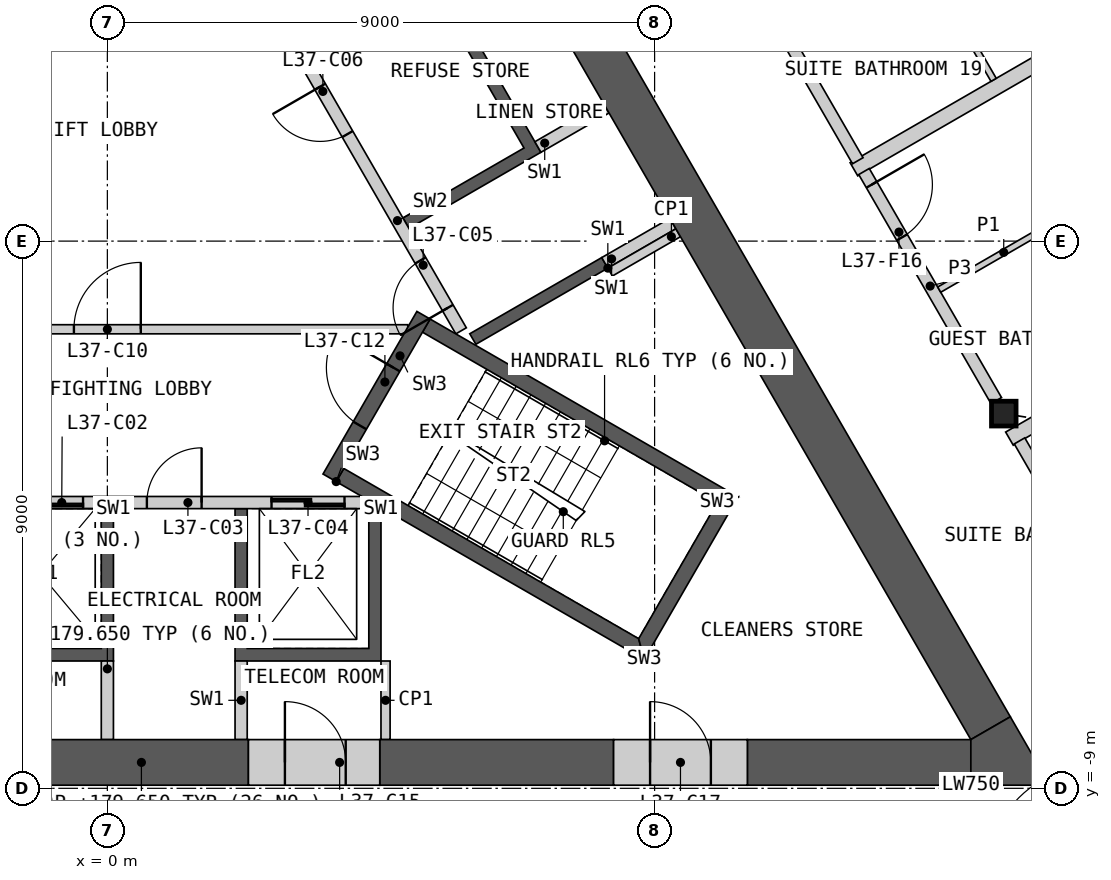
"""IFC4 building model, lengths in metres.
Left out: names, types, materials, properties, quantities, classifications, styles, units other than length and angle.
Written with IfcOpenShell. Run it as: python <this file> out.ifc"""

import sys

from ifc_helpers import new_model, si_unit, direction, frame, frame_2d, origin, origin_2d, place, context, subcontext, project, spatial, polyline, rectangle, i_section, outline, extrude, element, fill, save


model = new_model("IFC4")
c1 = context("Model", 3, precision=1e-05, world=origin(), true_north=direction((0.0, 1.0)))
c2 = subcontext(c1, "Body", "Model", "MODEL_VIEW")
j1 = project(units=[si_unit("LENGTHUNIT", "METRE"), si_unit("PLANEANGLEUNIT", "RADIAN")], contexts=[c1])
p1 = place(None, origin())
s1 = spatial("IfcSite", under=j1, at=p1, CompositionType="ELEMENT")
p2 = place(p1, origin())
s2 = spatial("IfcBuilding", under=s1, at=p2, CompositionType="ELEMENT")
p3 = place(p2, frame((0.0, 0.0, 176.4)))
s3 = spatial("IfcBuildingStorey", under=s2, at=p3, CompositionType="ELEMENT", Elevation=176.4)
p4 = place(p3, frame((14.743, -2.837, 0.0), z_axis=(0.0, 0.0, 1.0), x_axis=(1.0, 0.0, 0.0)))
e1 = element("IfcColumn", 1, at=p4, inside=s3, PredefinedType="COLUMN", context=c2, shape_type="SweptSolid", body=[
    extrude(i_section(OverallWidth=0.404, OverallDepth=0.407, WebThickness=0.027, FlangeThickness=0.044, at=origin_2d()), origin(), (0.0, 0.0, 1.0), 3.6),
])
p5 = place(p3, origin())
e2 = element("IfcWall", 2, at=p5, inside=s3, PredefinedType="SHEAR", context=c2, shape_type="SweptSolid", body=[
    extrude(outline(polyline([(4.5, -4.4), (4.5, -6.906), (2.1, -6.906), (2.1, -4.4), (2.3, -4.4), (2.3, -6.7), (4.3, -6.7), (4.3, -4.4), (4.5, -4.4)])), origin(), (0.0, 0.0, 1.0), 3.25),
])
p6 = place(p3, origin())
e3 = element("IfcWall", 3, at=p6, inside=s3, PredefinedType="SHEAR", context=c2, shape_type="SweptSolid", body=[
    extrude(outline(polyline([(0.1, -4.4), (0.1, -6.906), (-4.5, -6.906), (-4.5, -4.4), (-4.3, -4.4), (-4.3, -6.7), (-2.3, -6.7), (-2.3, -4.4), (-2.1, -4.4), (-2.1, -6.7), (-0.1, -6.7), (-0.1, -4.4), (0.1, -4.4)])), origin(), (0.0, 0.0, 1.0), 3.25),
])
p7 = place(p3, frame((-4.187, -4.3, 0.0), z_axis=(0.0, 0.0, 1.0), x_axis=(1.0, 0.0, 0.0)))
e4 = element("IfcWall", 4, at=p7, inside=s3, PredefinedType="SOLIDWALL", context=c2, shape_type="SweptSolid", body=[
    extrude(rectangle(XDim=8.373, YDim=0.2, at=frame_2d((4.187, 0.0))), origin(), (0.0, 0.0, 1.0), 3.25),
])
p8 = place(p7, frame((0.287, 0.0, 0.0)))
e5 = element("IfcOpeningElement", 5, at=p8, cuts=e4, PredefinedType="OPENING", context=c2, shape_type="SweptSolid", body=[
    extrude(rectangle(XDim=1.2, YDim=2.1, at=frame_2d((0.6, 1.05))), frame((0.0, 0.11, 0.0), z_axis=(0.0, -1.0, 0.0), x_axis=(1.0, 0.0, 0.0)), (0.0, 0.0, 1.0), 0.22),
])
p9 = place(p7, frame((2.387, 0.0, 0.0)))
e6 = element("IfcOpeningElement", 6, at=p9, cuts=e4, PredefinedType="OPENING", context=c2, shape_type="SweptSolid", body=[
    extrude(rectangle(XDim=1.4, YDim=2.1, at=frame_2d((0.7, 1.05))), frame((0.0, 0.11, 0.0), z_axis=(0.0, -1.0, 0.0), x_axis=(1.0, 0.0, 0.0)), (0.0, 0.0, 1.0), 0.22),
])
p10 = place(p7, frame((4.837, 0.0, 0.0)))
e7 = element("IfcOpeningElement", 7, at=p10, cuts=e4, PredefinedType="OPENING", context=c2, shape_type="SweptSolid", body=[
    extrude(rectangle(XDim=0.9, YDim=2.1, at=frame_2d((0.45, 1.05))), frame((0.0, 0.11, 0.0), z_axis=(0.0, -1.0, 0.0), x_axis=(1.0, 0.0, 0.0)), (0.0, 0.0, 1.0), 0.22),
])
p11 = place(p7, frame((6.887, 0.0, 0.0)))
e8 = element("IfcOpeningElement", 8, at=p11, cuts=e4, PredefinedType="OPENING", context=c2, shape_type="SweptSolid", body=[
    extrude(rectangle(XDim=1.2, YDim=2.1, at=frame_2d((0.6, 1.05))), frame((0.0, 0.11, 0.0), z_axis=(0.0, -1.0, 0.0), x_axis=(1.0, 0.0, 0.0)), (0.0, 0.0, 1.0), 0.22),
])
for number, where, z_axis, x_axis in (
    (9, (0.0, -6.906, 0.0), (0.0, 0.0, 1.0), (0.0, -1.0, 0.0)),
    (10, (2.2, -6.906, 0.0), (0.0, 0.0, 1.0), (0.0, -1.0, 0.0)),
):
    element("IfcWall", number, at=place(p3, frame(where, z_axis=z_axis, x_axis=x_axis)), inside=s3, PredefinedType="SHEAR", context=c2, shape_type="SweptSolid", body=[
        extrude(rectangle(XDim=1.293, YDim=0.2, at=frame_2d((0.646, 0.0))), origin(), (0.0, 0.0, 1.0), 3.25),
    ])
p12 = place(p3, origin())
e11 = element("IfcWall", 11, at=p12, inside=s3, PredefinedType="SHEAR", context=c2, shape_type="SweptSolid", body=[
    extrude(outline(polyline([(1.561, 6.097), (3.731, 7.35), (7.131, 1.461), (4.96, 0.208), (4.861, 0.381), (6.852, 1.531), (4.752, 5.169), (2.76, 4.019), (2.66, 4.192), (4.652, 5.342), (3.652, 7.074), (1.66, 5.924), (1.561, 6.097)])), origin(), (0.0, 0.0, 1.0), 3.25),
])
p13 = place(p3, origin())
e12 = element("IfcWall", 12, at=p13, inside=s3, PredefinedType="SHEAR", context=c2, shape_type="SweptSolid", body=[
    extrude(outline(polyline([(8.231, -0.444), (6.061, -1.697), (5.96, -1.524), (8.131, -0.271), (8.231, -0.444)])), origin(), (0.0, 0.0, 1.0), 3.25),
])
p14 = place(p3, frame((5.817, -1.476, 0.0), z_axis=(0.0, 0.0, 1.0), x_axis=(-0.500002616675, 0.866023893041, 0.0)))
e13 = element("IfcWall", 13, at=p14, inside=s3, PredefinedType="SOLIDWALL", context=c2, shape_type="SweptSolid", body=[
    extrude(rectangle(XDim=8.373, YDim=0.2, at=frame_2d((4.187, 0.0))), origin(), (0.0, 0.0, 1.0), 3.25),
])
p15 = place(p14, frame((0.437, 0.0, 0.0)))
e14 = element("IfcOpeningElement", 14, at=p15, cuts=e13, PredefinedType="OPENING", context=c2, shape_type="SweptSolid", body=[
    extrude(rectangle(XDim=0.9, YDim=2.1, at=frame_2d((0.45, 1.05))), frame((0.0, 0.11, 0.0), z_axis=(0.0, -1.0, 0.0), x_axis=(1.0, 0.0, 0.0)), (0.0, 0.0, 1.0), 0.22),
])
p16 = place(p14, frame((3.737, 0.0, 0.0)))
e15 = element("IfcOpeningElement", 15, at=p16, cuts=e13, PredefinedType="OPENING", context=c2, shape_type="SweptSolid", body=[
    extrude(rectangle(XDim=0.9, YDim=2.1, at=frame_2d((0.45, 1.05))), frame((0.0, 0.11, 0.0), z_axis=(0.0, -1.0, 0.0), x_axis=(1.0, 0.0, 0.0)), (0.0, 0.0, 1.0), 0.22),
])
p17 = place(p14, frame((6.937, 0.0, 0.0)))
e16 = element("IfcOpeningElement", 16, at=p17, cuts=e13, PredefinedType="OPENING", context=c2, shape_type="SweptSolid", body=[
    extrude(rectangle(XDim=1.1, YDim=2.1, at=frame_2d((0.55, 1.05))), frame((0.0, 0.11, 0.0), z_axis=(0.0, -1.0, 0.0), x_axis=(1.0, 0.0, 0.0)), (0.0, 0.0, 1.0), 0.22),
])
for number, where, z_axis, x_axis in (
    (17, (8.181, -0.357, 0.0), (0.0, 0.0, 1.0), (0.866, 0.5, 0.0)),
    (18, (7.081, 1.548, 0.0), (0.0, 0.0, 1.0), (0.866, 0.5, 0.0)),
):
    element("IfcWall", number, at=place(p3, frame(where, z_axis=z_axis, x_axis=x_axis)), inside=s3, PredefinedType="SHEAR", context=c2, shape_type="SweptSolid", body=[
        extrude(rectangle(XDim=1.293, YDim=0.2, at=frame_2d((0.646, 0.0))), origin(), (0.0, 0.0, 1.0), 3.25),
    ])
p18 = place(p3, frame((-4.941, -1.45, 0.0), z_axis=(0.0, 0.0, 1.0), x_axis=(1.0, 0.0, 0.0)))
e19 = element("IfcWall", 19, at=p18, inside=s3, PredefinedType="PARTITIONING", context=c2, shape_type="SweptSolid", body=[
    extrude(rectangle(XDim=9.882, YDim=0.15, at=frame_2d((4.941, 0.0))), origin(), (0.0, 0.0, 1.0), 3.25),
])
p19 = place(p18, frame((4.391, 0.0, 0.0)))
e20 = element("IfcOpeningElement", 20, at=p19, cuts=e19, PredefinedType="OPENING", context=c2, shape_type="SweptSolid", body=[
    extrude(rectangle(XDim=1.1, YDim=2.1, at=frame_2d((0.55, 1.05))), frame((0.0, 0.085, 0.0), z_axis=(0.0, -1.0, 0.0), x_axis=(1.0, 0.0, 0.0)), (0.0, 0.0, 1.0), 0.17),
])
p20 = place(p3, origin())
e21 = element("IfcWall", 21, at=p20, inside=s3, PredefinedType="SHEAR", context=c2, shape_type="SweptSolid", body=[
    extrude(outline(polyline([(3.763, -3.956), (8.83, -6.881), (8.738, -6.539), (3.888, -3.739), (3.763, -3.956)])), origin(), (0.0, 0.0, 1.0), 3.25),
])
p21 = place(p3, origin())
e22 = element("IfcWall", 22, at=p21, inside=s3, PredefinedType="SHEAR", context=c2, shape_type="SweptSolid", body=[
    extrude(outline(polyline([(8.83, -6.881), (10.374, -4.206), (10.032, -4.298), (8.738, -6.539), (8.83, -6.881)])), origin(), (0.0, 0.0, 1.0), 3.25),
])
p22 = place(p3, origin())
e23 = element("IfcWall", 23, at=p22, inside=s3, PredefinedType="SHEAR", context=c2, shape_type="SweptSolid", body=[
    extrude(outline(polyline([(10.032, -4.298), (10.374, -4.206), (5.307, -1.281), (5.182, -1.498), (10.032, -4.298)])), origin(), (0.0, 0.0, 1.0), 3.25),
])
p23 = place(p3, frame((3.655, -3.893, 0.0), z_axis=(0.0, 0.0, 1.0), x_axis=(0.499982516597, 0.866035497597, 0.0)))
e24 = element("IfcWall", 24, at=p23, inside=s3, PredefinedType="SHEAR", context=c2, shape_type="SweptSolid", body=[
    extrude(rectangle(XDim=3.088, YDim=0.25, at=frame_2d((1.544, 0.0))), origin(), (0.0, 0.0, 1.0), 3.25),
])
p24 = place(p23, frame((0.994, 0.0, 0.0)))
e25 = element("IfcOpeningElement", 25, at=p24, cuts=e24, PredefinedType="OPENING", context=c2, shape_type="SweptSolid", body=[
    extrude(rectangle(XDim=1.1, YDim=2.1, at=frame_2d((0.55, 1.05))), frame((0.0, 0.135, 0.0), z_axis=(0.0, -1.0, 0.0), x_axis=(1.0, 0.0, 0.0)), (0.0, 0.0, 1.0), 0.27),
])
for number, where, z_axis, x_axis in (
    (26, (4.575, -6.906, 0.0), (0.0, 0.0, 1.0), (0.0, -1.0, 0.0)),
    (27, (8.268, -0.509, 0.0), (0.0, 0.0, 1.0), (0.866, 0.5, 0.0)),
):
    element("IfcWall", number, at=place(p3, frame(where, z_axis=z_axis, x_axis=x_axis)), inside=s3, PredefinedType="PARTITIONING", context=c2, shape_type="SweptSolid", body=[
        extrude(rectangle(XDim=1.293, YDim=0.15, at=frame_2d((0.646, 0.0))), origin(), (0.0, 0.0, 1.0), 3.25),
    ])
p25 = place(p3, frame((4.48, -8.574, 0.0), z_axis=(0.0, 0.0, 1.0), x_axis=(1.0, 0.0, 0.0)))
e28 = element("IfcWall", 28, at=p25, inside=s3, PredefinedType="SHEAR", context=c2, shape_type="SweptSolid", body=[
    extrude(rectangle(XDim=3.845, YDim=0.75, at=frame_2d((1.923, 0.0))), origin(), (0.0, 0.0, 1.0), 3.25),
])
p26 = place(p3, frame((10.525, -8.574, 0.0), z_axis=(0.0, 0.0, 1.0), x_axis=(1.0, 0.0, 0.0)))
e29 = element("IfcWall", 29, at=p26, inside=s3, PredefinedType="SHEAR", context=c2, shape_type="SweptSolid", body=[
    extrude(rectangle(XDim=3.676, YDim=0.75, at=frame_2d((1.838, 0.0))), origin(), (0.0, 0.0, 1.0), 3.25),
])
p27 = place(p3, frame((-1.2, -8.574, 0.0), z_axis=(0.0, 0.0, 1.0), x_axis=(1.0, 0.0, 0.0)))
e30 = element("IfcWall", 30, at=p27, inside=s3, PredefinedType="SHEAR", context=c2, shape_type="SweptSolid", body=[
    extrude(rectangle(XDim=3.52, YDim=0.75, at=frame_2d((1.76, 0.0))), origin(), (0.0, 0.0, 1.0), 3.25),
])
p28 = place(p3, frame((14.526, -8.011, 0.0), z_axis=(0.0, 0.0, 1.0), x_axis=(-0.499994855372, 0.866028374016, 0.0)))
e31 = element("IfcWall", 31, at=p28, inside=s3, PredefinedType="SHEAR", context=c2, shape_type="SweptSolid", body=[
    extrude(rectangle(XDim=14.301, YDim=0.75, at=frame_2d((7.15, 0.0))), origin(), (0.0, 0.0, 1.0), 3.25),
])
p29 = place(p3, origin())
e32 = element("IfcWall", 32, at=p29, inside=s3, PredefinedType="SHEAR", context=c2, shape_type="SweptSolid", body=[
    extrude(outline(polyline([(14.201, -8.949), (14.201, -8.199), (14.851, -7.824), (15.5, -8.949), (14.201, -8.949)])), origin(), (0.0, 0.0, 1.0), 3.25),
])
p30 = place(p3, frame((2.32, -8.574, 0.0), z_axis=(0.0, 0.0, 1.0), x_axis=(1.0, 0.0, 0.0)))
e33 = element("IfcWall", 33, at=p30, inside=s3, PredefinedType="SHEAR", context=c2, shape_type="SweptSolid", body=[
    extrude(rectangle(XDim=2.16, YDim=0.75, at=frame_2d((1.08, 0.0))), origin(), (0.0, 0.0, 1.0), 3.25),
])
p31 = place(p30, frame((0.6, 0.0, 0.0)))
e34 = element("IfcOpeningElement", 34, at=p31, cuts=e33, PredefinedType="OPENING", context=c2, shape_type="SweptSolid", body=[
    extrude(rectangle(XDim=1.0, YDim=2.1, at=frame_2d((0.5, 1.05))), frame((0.0, 0.385, 0.0), z_axis=(0.0, -1.0, 0.0), x_axis=(1.0, 0.0, 0.0)), (0.0, 0.0, 1.0), 0.77),
])
p32 = place(p3, frame((8.325, -8.574, 0.0), z_axis=(0.0, 0.0, 1.0), x_axis=(1.0, 0.0, 0.0)))
e35 = element("IfcWall", 35, at=p32, inside=s3, PredefinedType="SHEAR", context=c2, shape_type="SweptSolid", body=[
    extrude(rectangle(XDim=2.2, YDim=0.75, at=frame_2d((1.1, 0.0))), origin(), (0.0, 0.0, 1.0), 3.25),
])
p33 = place(p32, frame((0.6, 0.0, 0.0)))
e36 = element("IfcOpeningElement", 36, at=p33, cuts=e35, PredefinedType="OPENING", context=c2, shape_type="SweptSolid", body=[
    extrude(rectangle(XDim=1.0, YDim=2.1, at=frame_2d((0.5, 1.05))), frame((0.0, 0.385, 0.0), z_axis=(0.0, -1.0, 0.0), x_axis=(1.0, 0.0, 0.0)), (0.0, 0.0, 1.0), 0.77),
])
p34 = place(p3, frame((14.836, -3.249, 0.0), z_axis=(0.0, 0.0, 1.0), x_axis=(0.866022412254, 0.500005181446, 0.0)))
e37 = element("IfcWall", 37, at=p34, inside=s3, PredefinedType="PARTITIONING", context=c2, shape_type="SweptSolid", body=[
    extrude(rectangle(XDim=13.081, YDim=0.25, at=frame_2d((6.541, 0.0))), origin(), (0.0, 0.0, 1.0), 2.404),
])
p35 = place(p3, frame((12.278, 1.182, 0.0), z_axis=(0.0, 0.0, 1.0), x_axis=(0.866024457297, 0.500001639361, 0.0)))
e38 = element("IfcWall", 38, at=p35, inside=s3, PredefinedType="PARTITIONING", context=c2, shape_type="SweptSolid", body=[
    extrude(rectangle(XDim=8.402, YDim=0.25, at=frame_2d((4.201, 0.0))), origin(), (0.0, 0.0, 1.0), 2.404),
])
p36 = place(p3, frame((15.002, -3.286, 0.0), z_axis=(0.0, 0.0, 1.0), x_axis=(0.500007607708, -0.866021011428, 0.0)))
e39 = element("IfcWall", 39, at=p36, inside=s3, PredefinedType="PARTITIONING", context=c2, shape_type="SweptSolid", body=[
    extrude(rectangle(XDim=5.484, YDim=0.2, at=frame_2d((2.742, 0.0))), origin(), (0.0, 0.0, 1.0), 3.25),
])
p37 = place(p36, frame((4.032, 0.0, 0.0)))
e40 = element("IfcOpeningElement", 40, at=p37, cuts=e39, PredefinedType="OPENING", context=c2, shape_type="SweptSolid", body=[
    extrude(rectangle(XDim=1.1, YDim=2.1, at=frame_2d((0.55, 1.05))), frame((0.0, 0.11, 0.0), z_axis=(0.0, -1.0, 0.0), x_axis=(1.0, 0.0, 0.0)), (0.0, 0.0, 1.0), 0.22),
])
p38 = place(p3, frame((9.952, 5.461, 0.0), z_axis=(0.0, 0.0, 1.0), x_axis=(0.499990736708, -0.866030751883, 0.0)))
e41 = element("IfcWall", 41, at=p38, inside=s3, PredefinedType="PARTITIONING", context=c2, shape_type="SweptSolid", body=[
    extrude(rectangle(XDim=4.779, YDim=0.2, at=frame_2d((2.389, 0.0))), origin(), (0.0, 0.0, 1.0), 3.25),
])
p39 = place(p3, frame((12.444, 1.145, 0.0), z_axis=(0.0, 0.0, 1.0), x_axis=(0.500007404367, -0.866021128829, 0.0)))
e42 = element("IfcWall", 42, at=p39, inside=s3, PredefinedType="PARTITIONING", context=c2, shape_type="SweptSolid", body=[
    extrude(rectangle(XDim=4.351, YDim=0.2, at=frame_2d((2.176, 0.0))), origin(), (0.0, 0.0, 1.0), 3.25),
])
p40 = place(p39, frame((0.25, 0.0, 0.0)))
e43 = element("IfcOpeningElement", 43, at=p40, cuts=e42, PredefinedType="OPENING", context=c2, shape_type="SweptSolid", body=[
    extrude(rectangle(XDim=1.0, YDim=2.1, at=frame_2d((0.5, 1.05))), frame((0.0, 0.11, 0.0), z_axis=(0.0, -1.0, 0.0), x_axis=(1.0, 0.0, 0.0)), (0.0, 0.0, 1.0), 0.22),
])
p41 = place(p3, frame((13.113, 5.186, 0.0), z_axis=(0.0, 0.0, 1.0), x_axis=(0.499963291492, -0.866046596414, 0.0)))
e44 = element("IfcWall", 44, at=p41, inside=s3, PredefinedType="PARTITIONING", context=c2, shape_type="SweptSolid", body=[
    extrude(rectangle(XDim=2.925, YDim=0.1, at=frame_2d((1.462, 0.0))), origin(), (0.0, 0.0, 1.0), 2.404),
])
p42 = place(p41, frame((0.25, 0.0, 0.0)))
e45 = element("IfcOpeningElement", 45, at=p42, cuts=e44, PredefinedType="OPENING", context=c2, shape_type="SweptSolid", body=[
    extrude(rectangle(XDim=0.95, YDim=2.1, at=frame_2d((0.475, 1.05))), frame((0.0, 0.06, 0.0), z_axis=(0.0, -1.0, 0.0), x_axis=(1.0, 0.0, 0.0)), (0.0, 0.0, 1.0), 0.12),
])
p43 = place(p3, frame((13.681, -0.798, 0.0), z_axis=(0.0, 0.0, 1.0), x_axis=(0.866032905446, 0.499987006516, 0.0)))
e46 = element("IfcWall", 46, at=p43, inside=s3, PredefinedType="PARTITIONING", context=c2, shape_type="SweptSolid", body=[
    extrude(rectangle(XDim=2.45, YDim=0.1, at=frame_2d((1.225, 0.0))), origin(), (0.0, 0.0, 1.0), 2.404),
])
p44 = place(p9, origin())
e47 = element("IfcDoor", 47, at=p44, inside=s3, OperationType="SLIDING_TO_LEFT", PredefinedType="DOOR", context=c2, shape_type="SweptSolid", body=[
    extrude(rectangle(XDim=1.4, YDim=2.1, at=frame_2d((0.7, 1.05))), frame((0.0, 0.025, 0.0), z_axis=(0.0, -1.0, 0.0), x_axis=(1.0, 0.0, 0.0)), (0.0, 0.0, 1.0), 0.05),
])
fill(e6, e47)
p45 = place(p10, origin())
e48 = element("IfcDoor", 48, at=p45, inside=s3, OperationType="SINGLE_SWING_RIGHT", PredefinedType="DOOR", context=c2, shape_type="SweptSolid", body=[
    extrude(rectangle(XDim=0.9, YDim=2.1, at=frame_2d((0.45, 1.05))), frame((0.0, 0.025, 0.0), z_axis=(0.0, -1.0, 0.0), x_axis=(1.0, 0.0, 0.0)), (0.0, 0.0, 1.0), 0.05),
])
fill(e7, e48)
p46 = place(p11, origin())
e49 = element("IfcDoor", 49, at=p46, inside=s3, OperationType="SLIDING_TO_LEFT", PredefinedType="DOOR", context=c2, shape_type="SweptSolid", body=[
    extrude(rectangle(XDim=1.2, YDim=2.1, at=frame_2d((0.6, 1.05))), frame((0.0, 0.025, 0.0), z_axis=(0.0, -1.0, 0.0), x_axis=(1.0, 0.0, 0.0)), (0.0, 0.0, 1.0), 0.05),
])
fill(e8, e49)
p47 = place(p15, origin())
e50 = element("IfcDoor", 50, at=p47, inside=s3, OperationType="SINGLE_SWING_LEFT", PredefinedType="DOOR", context=c2, shape_type="SweptSolid", body=[
    extrude(rectangle(XDim=0.9, YDim=2.1, at=frame_2d((0.45, 1.05))), frame((0.0, 0.025, 0.0), z_axis=(0.0, -1.0, 0.0), x_axis=(1.0, 0.0, 0.0)), (0.0, 0.0, 1.0), 0.05),
])
fill(e14, e50)
p48 = place(p16, origin())
e51 = element("IfcDoor", 51, at=p48, inside=s3, OperationType="SINGLE_SWING_RIGHT", PredefinedType="DOOR", context=c2, shape_type="SweptSolid", body=[
    extrude(rectangle(XDim=0.9, YDim=2.1, at=frame_2d((0.45, 1.05))), frame((0.0, 0.025, 0.0), z_axis=(0.0, -1.0, 0.0), x_axis=(1.0, 0.0, 0.0)), (0.0, 0.0, 1.0), 0.05),
])
fill(e15, e51)
p49 = place(p19, origin())
e52 = element("IfcDoor", 52, at=p49, inside=s3, OperationType="SINGLE_SWING_RIGHT", PredefinedType="DOOR", context=c2, shape_type="SweptSolid", body=[
    extrude(rectangle(XDim=1.1, YDim=2.1, at=frame_2d((0.55, 1.05))), frame((0.0, 0.025, 0.0), z_axis=(0.0, -1.0, 0.0), x_axis=(1.0, 0.0, 0.0)), (0.0, 0.0, 1.0), 0.05),
])
fill(e20, e52)
p50 = place(p24, origin())
e53 = element("IfcDoor", 53, at=p50, inside=s3, OperationType="SINGLE_SWING_RIGHT", PredefinedType="DOOR", context=c2, shape_type="SweptSolid", body=[
    extrude(rectangle(XDim=1.1, YDim=2.1, at=frame_2d((0.55, 1.05))), frame((0.0, 0.025, 0.0), z_axis=(0.0, -1.0, 0.0), x_axis=(1.0, 0.0, 0.0)), (0.0, 0.0, 1.0), 0.05),
])
fill(e25, e53)
p51 = place(p31, origin())
e54 = element("IfcDoor", 54, at=p51, inside=s3, OperationType="SINGLE_SWING_LEFT", PredefinedType="DOOR", context=c2, shape_type="SweptSolid", body=[
    extrude(rectangle(XDim=1.0, YDim=2.1, at=frame_2d((0.5, 1.05))), frame((0.0, 0.13, 0.0), z_axis=(0.0, -1.0, 0.0), x_axis=(1.0, 0.0, 0.0)), (0.0, 0.0, 1.0), 0.05),
])
fill(e34, e54)
p52 = place(p33, origin())
e55 = element("IfcDoor", 55, at=p52, inside=s3, OperationType="SINGLE_SWING_LEFT", PredefinedType="DOOR", context=c2, shape_type="SweptSolid", body=[
    extrude(rectangle(XDim=1.0, YDim=2.1, at=frame_2d((0.5, 1.05))), frame((0.0, 0.13, 0.0), z_axis=(0.0, -1.0, 0.0), x_axis=(1.0, 0.0, 0.0)), (0.0, 0.0, 1.0), 0.05),
])
fill(e36, e55)
p53 = place(p40, origin())
e56 = element("IfcDoor", 56, at=p53, inside=s3, OperationType="SINGLE_SWING_LEFT", PredefinedType="DOOR", context=c2, shape_type="SweptSolid", body=[
    extrude(rectangle(XDim=1.0, YDim=2.1, at=frame_2d((0.5, 1.05))), frame((0.0, 0.025, 0.0), z_axis=(0.0, -1.0, 0.0), x_axis=(1.0, 0.0, 0.0)), (0.0, 0.0, 1.0), 0.05),
])
fill(e43, e56)
save(model, sys.argv[1])
